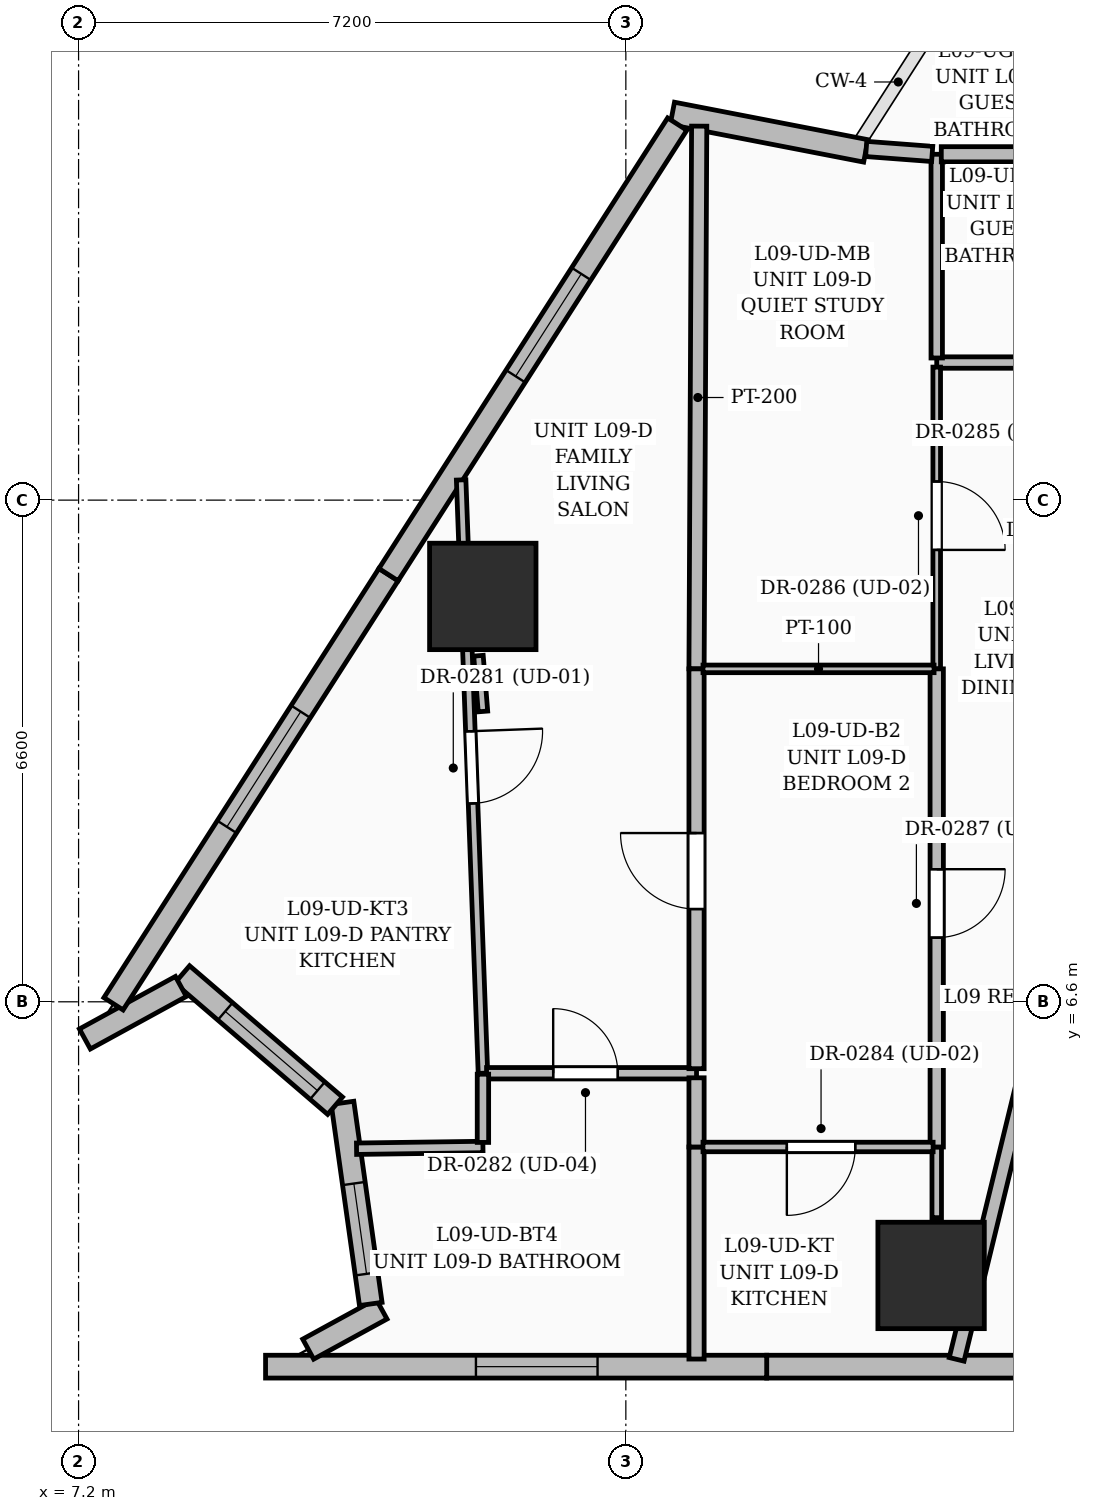
"""IFC4 building model, lengths in metres.
Left out: names, types, materials, properties, quantities, classifications, styles, units other than length and angle.
Written with IfcOpenShell. Run it as: python <this file> out.ifc"""

import sys

from ifc_helpers import new_model, si_unit, direction, frame, frame_2d, origin, origin_2d, place, context, subcontext, project, spatial, rectangle, extrude, element, fill, save


model = new_model("IFC4")
c1 = context("Model", 3, precision=1e-05, world=origin(), true_north=direction((0.0, 1.0)))
c2 = subcontext(c1, "Body", "Model", "MODEL_VIEW")
j1 = project(units=[si_unit("LENGTHUNIT", "METRE"), si_unit("PLANEANGLEUNIT", "RADIAN")], contexts=[c1])
p1 = place(None, origin())
s1 = spatial("IfcSite", under=j1, at=p1, CompositionType="ELEMENT")
p2 = place(p1, origin())
s2 = spatial("IfcBuilding", under=s1, at=p2, CompositionType="ELEMENT")
p3 = place(p2, frame((0.0, 0.0, 42.6)))
s3 = spatial("IfcBuildingStorey", under=s2, at=p3, CompositionType="ELEMENT", Elevation=42.6)
for number, where, z_axis, x_axis in (
    (1, (18.416, 3.0, 0.0), (0.0, 0.0, 1.0), (1.0, 0.0, 0.0)),
    (2, (12.518, 11.933, 0.0), (0.0, 0.0, 1.0), (1.0, 0.0, 0.0)),
):
    element("IfcColumn", number, at=place(p3, frame(where, z_axis=z_axis, x_axis=x_axis)), inside=s3, PredefinedType="COLUMN", context=c2, shape_type="SweptSolid", body=[
        extrude(rectangle(XDim=1.4, YDim=1.4, at=origin_2d()), origin(), (0.0, 0.0, 1.0), 3.6),
    ])
p4 = place(p3, frame((15.012, 18.288, 0.0), z_axis=(0.0, 0.0, 1.0), x_axis=(0.981746971615, -0.190191702567, 0.0)))
e3 = element("IfcWall", 3, at=p4, inside=s3, PredefinedType="SOLIDWALL", context=c2, shape_type="SweptSolid", body=[
    extrude(rectangle(XDim=2.593, YDim=0.3, at=frame_2d((1.296, 0.0))), origin(), (0.0, 0.0, 1.0), 2.375),
])
p5 = place(p3, frame((22.846, 1.8, 0.0), z_axis=(0.0, 0.0, 1.0), x_axis=(-1.0, 0.0, 0.0)))
e4 = element("IfcWall", 4, at=p5, inside=s3, PredefinedType="SOLIDWALL", context=c2, shape_type="SweptSolid", body=[
    extrude(rectangle(XDim=6.593, YDim=0.3, at=frame_2d((3.296, 0.0))), origin(), (0.0, 0.0, 1.0), 3.35),
])
p6 = place(p5, frame((1.25, 0.0, 0.6)))
e5 = element("IfcOpeningElement", 5, at=p6, cuts=e4, PredefinedType="OPENING", context=c2, shape_type="SweptSolid", body=[
    extrude(rectangle(XDim=1.8, YDim=2.1, at=frame_2d((0.9, 1.05))), frame((0.0, 0.16, 0.0), z_axis=(0.0, -1.0, 0.0), x_axis=(1.0, 0.0, 0.0)), (0.0, 0.0, 1.0), 0.32),
])
p7 = place(p3, frame((16.253, 1.8, 0.0), z_axis=(0.0, 0.0, 1.0), x_axis=(-1.0, 0.0, 0.0)))
e6 = element("IfcWall", 6, at=p7, inside=s3, PredefinedType="SOLIDWALL", context=c2, shape_type="SweptSolid", body=[
    extrude(rectangle(XDim=6.593, YDim=0.3, at=frame_2d((3.296, 0.0))), origin(), (0.0, 0.0, 1.0), 3.35),
])
p8 = place(p7, frame((2.225, 0.0, 0.55)))
e7 = element("IfcOpeningElement", 7, at=p8, cuts=e6, PredefinedType="OPENING", context=c2, shape_type="SweptSolid", body=[
    extrude(rectangle(XDim=1.6, YDim=2.2, at=frame_2d((0.8, 1.1))), frame((0.0, 0.16, 0.0), z_axis=(0.0, -1.0, 0.0), x_axis=(1.0, 0.0, 0.0)), (0.0, 0.0, 1.0), 0.32),
])
p9 = place(p3, frame((10.221, 2.031, 0.0), z_axis=(0.0, 0.0, 1.0), x_axis=(0.877343386297, 0.479863087266, 0.0)))
e8 = element("IfcWall", 8, at=p9, inside=s3, PredefinedType="SOLIDWALL", context=c2, shape_type="SweptSolid", body=[
    extrude(rectangle(XDim=1.099, YDim=0.3, at=frame_2d((0.55, 0.0))), origin(), (0.0, 0.0, 1.0), 3.35),
])
p10 = place(p3, frame((11.044, 2.625, 0.0), z_axis=(0.0, 0.0, 1.0), x_axis=(-0.139079814349, 0.990281174839, 0.0)))
e9 = element("IfcWall", 9, at=p10, inside=s3, PredefinedType="SOLIDWALL", context=c2, shape_type="SweptSolid", body=[
    extrude(rectangle(XDim=2.672, YDim=0.3, at=frame_2d((1.336, 0.0))), origin(), (0.0, 0.0, 1.0), 3.35),
])
p11 = place(p10, frame((0.4, 0.0, 0.8)))
e10 = element("IfcOpeningElement", 10, at=p11, cuts=e9, PredefinedType="OPENING", context=c2, shape_type="SweptSolid", body=[
    extrude(rectangle(XDim=1.2, YDim=1.8, at=frame_2d((0.6, 0.9))), frame((0.0, 0.16, 0.0), z_axis=(0.0, -1.0, 0.0), x_axis=(1.0, 0.0, 0.0)), (0.0, 0.0, 1.0), 0.32),
])
p12 = place(p3, frame((10.574, 5.233, 0.0), z_axis=(0.0, 0.0, 1.0), x_axis=(-0.758703874518, 0.651435668958, 0.0)))
e11 = element("IfcWall", 11, at=p12, inside=s3, PredefinedType="SOLIDWALL", context=c2, shape_type="SweptSolid", body=[
    extrude(rectangle(XDim=2.652, YDim=0.3, at=frame_2d((1.326, 0.0))), origin(), (0.0, 0.0, 1.0), 3.35),
])
p13 = place(p12, frame((0.305, 0.0, 0.55)))
e12 = element("IfcOpeningElement", 12, at=p13, cuts=e11, PredefinedType="OPENING", context=c2, shape_type="SweptSolid", body=[
    extrude(rectangle(XDim=1.6, YDim=2.2, at=frame_2d((0.8, 1.1))), frame((0.0, 0.16, 0.0), z_axis=(0.0, -1.0, 0.0), x_axis=(1.0, 0.0, 0.0)), (0.0, 0.0, 1.0), 0.32),
])
p14 = place(p3, frame((8.546, 6.802, 0.0), z_axis=(0.0, 0.0, 1.0), x_axis=(-0.877298620335, -0.479944924714, 0.0)))
e13 = element("IfcWall", 13, at=p14, inside=s3, PredefinedType="SOLIDWALL", context=c2, shape_type="SweptSolid", body=[
    extrude(rectangle(XDim=1.44, YDim=0.3, at=frame_2d((0.72, 0.0))), origin(), (0.0, 0.0, 1.0), 3.35),
])
p15 = place(p3, frame((7.66, 6.574, 0.0), z_axis=(0.0, 0.0, 1.0), x_axis=(0.539544361319, 0.841957173595, 0.0)))
e14 = element("IfcWall", 14, at=p15, inside=s3, PredefinedType="SOLIDWALL", context=c2, shape_type="SweptSolid", body=[
    extrude(rectangle(XDim=6.706, YDim=0.3, at=frame_2d((3.353, 0.0))), origin(), (0.0, 0.0, 1.0), 3.35),
])
p16 = place(p15, frame((2.765, 0.0, 0.6)))
e15 = element("IfcOpeningElement", 15, at=p16, cuts=e14, PredefinedType="OPENING", context=c2, shape_type="SweptSolid", body=[
    extrude(rectangle(XDim=1.8, YDim=2.1, at=frame_2d((0.9, 1.05))), frame((0.0, 0.16, 0.0), z_axis=(0.0, -1.0, 0.0), x_axis=(1.0, 0.0, 0.0)), (0.0, 0.0, 1.0), 0.32),
])
p17 = place(p3, frame((11.278, 12.219, 0.0), z_axis=(0.0, 0.0, 1.0), x_axis=(0.539524946774, 0.84196961454, 0.0)))
e16 = element("IfcWall", 16, at=p17, inside=s3, PredefinedType="SOLIDWALL", context=c2, shape_type="SweptSolid", body=[
    extrude(rectangle(XDim=7.041, YDim=0.3, at=frame_2d((3.52, 0.0))), origin(), (0.0, 0.0, 1.0), 3.35),
])
p18 = place(p17, frame((3.1, 0.0, 0.55)))
e17 = element("IfcOpeningElement", 17, at=p18, cuts=e16, PredefinedType="OPENING", context=c2, shape_type="SweptSolid", body=[
    extrude(rectangle(XDim=1.6, YDim=2.2, at=frame_2d((0.8, 1.1))), frame((0.0, 0.16, 0.0), z_axis=(0.0, -1.0, 0.0), x_axis=(1.0, 0.0, 0.0)), (0.0, 0.0, 1.0), 0.32),
])
p19 = place(p3, frame((12.233, 13.466, 0.0), z_axis=(0.0, 0.0, 1.0), x_axis=(0.036755031692, -0.999324305541, 0.0)))
e18 = element("IfcWall", 18, at=p19, inside=s3, PredefinedType="PARTITIONING", context=c2, shape_type="SweptSolid", body=[
    extrude(rectangle(XDim=7.812, YDim=0.125, at=frame_2d((3.906, 0.0))), origin(), (0.0, 0.0, 1.0), 3.35),
])
p20 = place(p19, frame((3.309, 0.0, 0.0)))
e19 = element("IfcOpeningElement", 19, at=p20, cuts=e18, PredefinedType="OPENING", context=c2, shape_type="SweptSolid", body=[
    extrude(rectangle(XDim=0.95, YDim=2.2, at=frame_2d((0.475, 1.1))), frame((0.0, 0.072, 0.0), z_axis=(0.0, -1.0, 0.0), x_axis=(1.0, 0.0, 0.0)), (0.0, 0.0, 1.0), 0.145),
])
p21 = place(p3, frame((12.567, 5.66, 0.0), z_axis=(0.0, 0.0, 1.0), x_axis=(1.0, 0.0, 0.0)))
e20 = element("IfcWall", 20, at=p21, inside=s3, PredefinedType="PARTITIONING", context=c2, shape_type="SweptSolid", body=[
    extrude(rectangle(XDim=2.763, YDim=0.15, at=frame_2d((1.381, 0.0))), origin(), (0.0, 0.0, 1.0), 3.35),
])
p22 = place(p21, frame((0.876, 0.0, 0.0)))
e21 = element("IfcOpeningElement", 21, at=p22, cuts=e20, PredefinedType="OPENING", context=c2, shape_type="SweptSolid", body=[
    extrude(rectangle(XDim=0.85, YDim=2.1, at=frame_2d((0.425, 1.05))), frame((0.0, 0.085, 0.0), z_axis=(0.0, -1.0, 0.0), x_axis=(1.0, 0.0, 0.0)), (0.0, 0.0, 1.0), 0.17),
])
p23 = place(p3, frame((15.33, 10.98, 0.0), z_axis=(0.0, 0.0, 1.0), x_axis=(0.004889499098, 0.999988046328, 0.0)))
e22 = element("IfcWall", 22, at=p23, inside=s3, PredefinedType="PARTITIONING", context=c2, shape_type="SweptSolid", body=[
    extrude(rectangle(XDim=7.14, YDim=0.2, at=frame_2d((3.57, 0.0))), origin(), (0.0, 0.0, 1.0), 2.279),
])
p24 = place(p3, frame((15.33, 5.72, 0.0), z_axis=(0.0, 0.0, 1.0), x_axis=(0.0, 1.0, 0.0)))
e23 = element("IfcWall", 23, at=p24, inside=s3, PredefinedType="PARTITIONING", context=c2, shape_type="SweptSolid", body=[
    extrude(rectangle(XDim=5.26, YDim=0.2, at=frame_2d((2.63, 0.0))), origin(), (0.0, 0.0, 1.0), 2.279),
])
p25 = place(p24, frame((2.1, 0.0, 0.0)))
e24 = element("IfcOpeningElement", 24, at=p25, cuts=e23, PredefinedType="OPENING", context=c2, shape_type="SweptSolid", body=[
    extrude(rectangle(XDim=1.0, YDim=2.2, at=frame_2d((0.5, 1.1))), frame((0.0, 0.11, 0.0), z_axis=(0.0, -1.0, 0.0), x_axis=(1.0, 0.0, 0.0)), (0.0, 0.0, 1.0), 0.22),
])
p26 = place(p3, frame((10.857, 4.667, 0.0), z_axis=(0.0, 0.0, 1.0), x_axis=(0.999904804939, 0.013797864308, 0.0)))
e25 = element("IfcWall", 25, at=p26, inside=s3, PredefinedType="PARTITIONING", context=c2, shape_type="SweptSolid", body=[
    extrude(rectangle(XDim=1.663, YDim=0.15, at=frame_2d((0.832, 0.0))), origin(), (0.0, 0.0, 1.0), 3.35),
])
p27 = place(p3, frame((12.52, 4.75, 0.0), z_axis=(0.0, 0.0, 1.0), x_axis=(0.0, 1.0, 0.0)))
e26 = element("IfcWall", 26, at=p27, inside=s3, PredefinedType="PARTITIONING", context=c2, shape_type="SweptSolid", body=[
    extrude(rectangle(XDim=0.897, YDim=0.15, at=frame_2d((0.449, 0.0))), origin(), (0.0, 0.0, 1.0), 3.35),
])
p28 = place(p3, frame((15.33, 1.9, 0.0), z_axis=(0.0, 0.0, 1.0), x_axis=(0.0, 1.0, 0.0)))
e27 = element("IfcWall", 27, at=p28, inside=s3, PredefinedType="PARTITIONING", context=c2, shape_type="SweptSolid", body=[
    extrude(rectangle(XDim=2.79, YDim=0.2, at=frame_2d((1.395, 0.0))), origin(), (0.0, 0.0, 1.0), 3.35),
])
p29 = place(p3, frame((15.33, 4.69, 0.0), z_axis=(0.0, 0.0, 1.0), x_axis=(0.0, 1.0, 0.0)))
e28 = element("IfcWall", 28, at=p29, inside=s3, PredefinedType="PARTITIONING", context=c2, shape_type="SweptSolid", body=[
    extrude(rectangle(XDim=0.91, YDim=0.2, at=frame_2d((0.455, 0.0))), origin(), (0.0, 0.0, 1.0), 3.35),
])
p30 = place(p3, frame((21.4, 12.75, 0.0), z_axis=(0.0, 0.0, 1.0), x_axis=(-0.237009503741, -0.971507331489, 0.0)))
e29 = element("IfcWall", 29, at=p30, inside=s3, PredefinedType="PARTITIONING", context=c2, shape_type="SweptSolid", body=[
    extrude(rectangle(XDim=11.172, YDim=0.2, at=frame_2d((5.586, 0.0))), origin(), (0.0, 0.0, 1.0), 2.279),
])
p31 = place(p3, frame((21.315, 15.01, 0.0), z_axis=(0.0, 0.0, 1.0), x_axis=(-1.0, 0.0, 0.0)))
e30 = element("IfcWall", 30, at=p31, inside=s3, PredefinedType="PARTITIONING", context=c2, shape_type="SweptSolid", body=[
    extrude(rectangle(XDim=2.825, YDim=0.15, at=frame_2d((1.413, 0.0))), origin(), (0.0, 0.0, 1.0), 2.787),
])
p32 = place(p31, frame((0.886, 0.0, 0.0)))
e31 = element("IfcOpeningElement", 31, at=p32, cuts=e30, PredefinedType="OPENING", context=c2, shape_type="SweptSolid", body=[
    extrude(rectangle(XDim=0.85, YDim=2.1, at=frame_2d((0.425, 1.05))), frame((0.0, 0.085, 0.0), z_axis=(0.0, -1.0, 0.0), x_axis=(1.0, 0.0, 0.0)), (0.0, 0.0, 1.0), 0.17),
])
p33 = place(p3, frame((18.49, 4.69, 0.0), z_axis=(0.0, 0.0, 1.0), x_axis=(0.0, -1.0, 0.0)))
e32 = element("IfcWall", 32, at=p33, inside=s3, PredefinedType="PARTITIONING", context=c2, shape_type="SweptSolid", body=[
    extrude(rectangle(XDim=0.93, YDim=0.125, at=frame_2d((0.465, 0.0))), origin(), (0.0, 0.0, 1.0), 3.35),
])
p34 = place(p3, frame((18.49, 14.95, 0.0), z_axis=(0.0, 0.0, 1.0), x_axis=(0.0, -1.0, 0.0)))
e33 = element("IfcWall", 33, at=p34, inside=s3, PredefinedType="PARTITIONING", context=c2, shape_type="SweptSolid", body=[
    extrude(rectangle(XDim=3.97, YDim=0.1, at=frame_2d((1.985, 0.0))), origin(), (0.0, 0.0, 1.0), 2.787),
])
p35 = place(p34, frame((1.505, 0.0, 0.0)))
e34 = element("IfcOpeningElement", 34, at=p35, cuts=e33, PredefinedType="OPENING", context=c2, shape_type="SweptSolid", body=[
    extrude(rectangle(XDim=0.9, YDim=2.15, at=frame_2d((0.45, 1.075))), frame((0.0, 0.06, 0.0), z_axis=(0.0, -1.0, 0.0), x_axis=(1.0, 0.0, 0.0)), (0.0, 0.0, 1.0), 0.12),
])
p36 = place(p3, frame((18.49, 10.98, 0.0), z_axis=(0.0, 0.0, 1.0), x_axis=(0.0, -1.0, 0.0)))
e35 = element("IfcWall", 35, at=p36, inside=s3, PredefinedType="PARTITIONING", context=c2, shape_type="SweptSolid", body=[
    extrude(rectangle(XDim=6.29, YDim=0.175, at=frame_2d((3.145, 0.0))), origin(), (0.0, 0.0, 1.0), 2.279),
])
p37 = place(p36, frame((2.635, 0.0, 0.0)))
e36 = element("IfcOpeningElement", 36, at=p37, cuts=e35, PredefinedType="OPENING", context=c2, shape_type="SweptSolid", body=[
    extrude(rectangle(XDim=0.9, YDim=2.15, at=frame_2d((0.45, 1.075))), frame((0.0, 0.097, 0.0), z_axis=(0.0, -1.0, 0.0), x_axis=(1.0, 0.0, 0.0)), (0.0, 0.0, 1.0), 0.195),
])
p38 = place(p3, frame((18.49, 17.75, 0.0), z_axis=(0.0, 0.0, 1.0), x_axis=(0.0, -1.0, 0.0)))
e37 = element("IfcWall", 37, at=p38, inside=s3, PredefinedType="PARTITIONING", context=c2, shape_type="SweptSolid", body=[
    extrude(rectangle(XDim=2.68, YDim=0.15, at=frame_2d((1.34, 0.0))), origin(), (0.0, 0.0, 1.0), 2.787),
])
p39 = place(p3, frame((20.99, 17.75, 0.0), z_axis=(0.0, 0.0, 1.0), x_axis=(-1.0, 0.0, 0.0)))
e38 = element("IfcWall", 38, at=p39, inside=s3, PredefinedType="PARTITIONING", context=c2, shape_type="SweptSolid", body=[
    extrude(rectangle(XDim=2.44, YDim=0.2, at=frame_2d((1.22, 0.0))), origin(), (0.0, 0.0, 1.0), 2.787),
])
p40 = place(p3, frame((18.442, 4.69, 0.0), z_axis=(0.0, 0.0, 1.0), x_axis=(-1.0, 0.0, 0.0)))
e39 = element("IfcWall", 39, at=p40, inside=s3, PredefinedType="PARTITIONING", context=c2, shape_type="SweptSolid", body=[
    extrude(rectangle(XDim=3.027, YDim=0.125, at=frame_2d((1.514, 0.0))), origin(), (0.0, 0.0, 1.0), 2.37),
])
p41 = place(p40, frame((1.024, 0.0, 0.0)))
e40 = element("IfcOpeningElement", 40, at=p41, cuts=e39, PredefinedType="OPENING", context=c2, shape_type="SweptSolid", body=[
    extrude(rectangle(XDim=0.9, YDim=2.15, at=frame_2d((0.45, 1.075))), frame((0.0, 0.072, 0.0), z_axis=(0.0, -1.0, 0.0), x_axis=(1.0, 0.0, 0.0)), (0.0, 0.0, 1.0), 0.145),
])
p42 = place(p3, frame((15.415, 10.98, 0.0), z_axis=(0.0, 0.0, 1.0), x_axis=(1.0, 0.0, 0.0)))
e41 = element("IfcWall", 41, at=p42, inside=s3, PredefinedType="PARTITIONING", context=c2, shape_type="SweptSolid", body=[
    extrude(rectangle(XDim=3.04, YDim=0.1, at=frame_2d((1.52, 0.0))), origin(), (0.0, 0.0, 1.0), 2.279),
])
p43 = place(p3, frame((18.43, 17.754, 0.0), z_axis=(0.0, 0.0, 1.0), x_axis=(-0.997151002859, 0.07543127665, 0.0)))
e42 = element("IfcWall", 42, at=p43, inside=s3, PredefinedType="PARTITIONING", context=c2, shape_type="SweptSolid", body=[
    extrude(rectangle(XDim=0.871, YDim=0.2, at=frame_2d((0.435, 0.0))), origin(), (0.0, 0.0, 1.0), 3.35),
])
p44 = place(p3, frame((12.461, 11.153, 0.0), z_axis=(0.0, 0.0, 1.0), x_axis=(0.08032568051, -0.996768671784, 0.0)))
e43 = element("IfcWall", 43, at=p44, inside=s3, PredefinedType="PARTITIONING", context=c2, shape_type="SweptSolid", body=[
    extrude(rectangle(XDim=0.736, YDim=0.125, at=frame_2d((0.368, 0.0))), origin(), (0.0, 0.0, 1.0), 3.35),
])
p45 = place(p8, origin())
e44 = element("IfcWindow", 44, at=p45, inside=s3, PartitioningType="SINGLE_PANEL", PredefinedType="WINDOW", context=c2, shape_type="SweptSolid", body=[
    extrude(rectangle(XDim=1.6, YDim=2.2, at=frame_2d((0.8, 1.1))), frame((0.0, 0.03, 0.0), z_axis=(0.0, -1.0, 0.0), x_axis=(1.0, 0.0, 0.0)), (0.0, 0.0, 1.0), 0.06),
])
fill(e7, e44)
p46 = place(p11, origin())
e45 = element("IfcWindow", 45, at=p46, inside=s3, PartitioningType="SINGLE_PANEL", PredefinedType="WINDOW", context=c2, shape_type="SweptSolid", body=[
    extrude(rectangle(XDim=1.2, YDim=1.8, at=frame_2d((0.6, 0.9))), frame((0.0, 0.03, 0.0), z_axis=(0.0, -1.0, 0.0), x_axis=(1.0, 0.0, 0.0)), (0.0, 0.0, 1.0), 0.06),
])
fill(e10, e45)
p47 = place(p13, origin())
e46 = element("IfcWindow", 46, at=p47, inside=s3, PartitioningType="SINGLE_PANEL", PredefinedType="WINDOW", context=c2, shape_type="SweptSolid", body=[
    extrude(rectangle(XDim=1.6, YDim=2.2, at=frame_2d((0.8, 1.1))), frame((0.0, 0.03, 0.0), z_axis=(0.0, -1.0, 0.0), x_axis=(1.0, 0.0, 0.0)), (0.0, 0.0, 1.0), 0.06),
])
fill(e12, e46)
p48 = place(p16, origin())
e47 = element("IfcWindow", 47, at=p48, inside=s3, PartitioningType="SINGLE_PANEL", PredefinedType="WINDOW", context=c2, shape_type="SweptSolid", body=[
    extrude(rectangle(XDim=1.8, YDim=2.1, at=frame_2d((0.9, 1.05))), frame((0.0, 0.03, 0.0), z_axis=(0.0, -1.0, 0.0), x_axis=(1.0, 0.0, 0.0)), (0.0, 0.0, 1.0), 0.06),
])
fill(e15, e47)
p49 = place(p18, origin())
e48 = element("IfcWindow", 48, at=p49, inside=s3, PartitioningType="SINGLE_PANEL", PredefinedType="WINDOW", context=c2, shape_type="SweptSolid", body=[
    extrude(rectangle(XDim=1.6, YDim=2.2, at=frame_2d((0.8, 1.1))), frame((0.0, 0.03, 0.0), z_axis=(0.0, -1.0, 0.0), x_axis=(1.0, 0.0, 0.0)), (0.0, 0.0, 1.0), 0.06),
])
fill(e17, e48)
p50 = place(p20, origin())
e49 = element("IfcDoor", 49, at=p50, inside=s3, OperationType="SINGLE_SWING_LEFT", PredefinedType="DOOR", context=c2, shape_type="SweptSolid", body=[
    extrude(rectangle(XDim=0.95, YDim=2.2, at=frame_2d((0.475, 1.1))), frame((0.0, 0.025, 0.0), z_axis=(0.0, -1.0, 0.0), x_axis=(1.0, 0.0, 0.0)), (0.0, 0.0, 1.0), 0.05),
])
fill(e19, e49)
p51 = place(p22, origin())
e50 = element("IfcDoor", 50, at=p51, inside=s3, OperationType="SINGLE_SWING_LEFT", PredefinedType="DOOR", context=c2, shape_type="SweptSolid", body=[
    extrude(rectangle(XDim=0.85, YDim=2.1, at=frame_2d((0.425, 1.05))), frame((0.0, 0.025, 0.0), z_axis=(0.0, -1.0, 0.0), x_axis=(1.0, 0.0, 0.0)), (0.0, 0.0, 1.0), 0.05),
])
fill(e21, e50)
p52 = place(p41, origin())
e51 = element("IfcDoor", 51, at=p52, inside=s3, OperationType="SINGLE_SWING_RIGHT", PredefinedType="DOOR", context=c2, shape_type="SweptSolid", body=[
    extrude(rectangle(XDim=0.9, YDim=2.15, at=frame_2d((0.45, 1.075))), frame((0.0, 0.025, 0.0), z_axis=(0.0, -1.0, 0.0), x_axis=(1.0, 0.0, 0.0)), (0.0, 0.0, 1.0), 0.05),
])
fill(e40, e51)
p53 = place(p35, origin())
e52 = element("IfcDoor", 52, at=p53, inside=s3, OperationType="SINGLE_SWING_RIGHT", PredefinedType="DOOR", context=c2, shape_type="SweptSolid", body=[
    extrude(rectangle(XDim=0.9, YDim=2.15, at=frame_2d((0.45, 1.075))), frame((0.0, 0.025, 0.0), z_axis=(0.0, -1.0, 0.0), x_axis=(1.0, 0.0, 0.0)), (0.0, 0.0, 1.0), 0.05),
])
fill(e34, e52)
p54 = place(p37, origin())
e53 = element("IfcDoor", 53, at=p54, inside=s3, OperationType="SINGLE_SWING_LEFT", PredefinedType="DOOR", context=c2, shape_type="SweptSolid", body=[
    extrude(rectangle(XDim=0.9, YDim=2.15, at=frame_2d((0.45, 1.075))), frame((0.0, 0.025, 0.0), z_axis=(0.0, -1.0, 0.0), x_axis=(1.0, 0.0, 0.0)), (0.0, 0.0, 1.0), 0.05),
])
fill(e36, e53)
p55 = place(p25, origin())
e54 = element("IfcDoor", 54, at=p55, inside=s3, OperationType="SINGLE_SWING_RIGHT", PredefinedType="DOOR", context=c2, shape_type="SweptSolid", body=[
    extrude(rectangle(XDim=1.0, YDim=2.2, at=frame_2d((0.5, 1.1))), frame((0.0, 0.025, 0.0), z_axis=(0.0, -1.0, 0.0), x_axis=(1.0, 0.0, 0.0)), (0.0, 0.0, 1.0), 0.05),
])
fill(e24, e54)
save(model, sys.argv[1])
